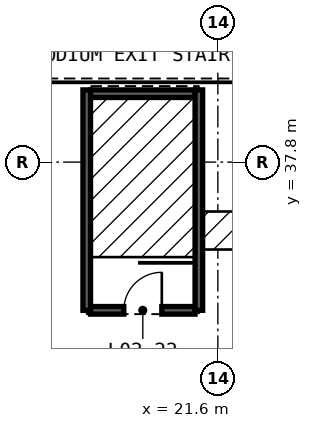
"""IFC4 building model, lengths in metres.
Left out: names, types, materials, properties, quantities, classifications, styles, units other than length and angle.
Written with IfcOpenShell. Run it as: python <this file> out.ifc"""

import sys

from ifc_helpers import new_model, si_unit, direction, frame, frame_2d, origin, place, context, subcontext, project, spatial, rectangle, extrude, element, fill, save


model = new_model("IFC4")
c1 = context("Model", 3, precision=1e-05, world=origin(), true_north=direction((0.0, 1.0)))
c2 = subcontext(c1, "Body", "Model", "MODEL_VIEW")
j1 = project(units=[si_unit("LENGTHUNIT", "METRE"), si_unit("PLANEANGLEUNIT", "RADIAN")], contexts=[c1])
p1 = place(None, origin())
s1 = spatial("IfcSite", under=j1, at=p1, CompositionType="ELEMENT")
p2 = place(p1, origin())
s2 = spatial("IfcBuilding", under=s1, at=p2, CompositionType="ELEMENT")
p3 = place(p2, frame((0.0, 0.0, 9.0)))
s3 = spatial("IfcBuildingStorey", under=s2, at=p3, CompositionType="ELEMENT", Elevation=9.0)
p4 = place(p3, frame((18.25, 33.9, 0.0), z_axis=(0.0, 0.0, 1.0), x_axis=(1.0, 0.0, 0.0)))
e1 = element("IfcWall", 1, at=p4, inside=s3, PredefinedType="SOLIDWALL", context=c2, shape_type="SweptSolid", body=[
    extrude(rectangle(XDim=2.75, YDim=0.2, at=frame_2d((1.375, 0.0))), origin(), (0.0, 0.0, 1.0), 3.0),
])
p5 = place(p4, frame((1.875, 0.0, 0.0), z_axis=(0.0, 0.0, 1.0), x_axis=(-1.0, 0.0, 0.0)))
e2 = element("IfcOpeningElement", 2, at=p5, cuts=e1, PredefinedType="OPENING", context=c2, shape_type="SweptSolid", body=[
    extrude(rectangle(XDim=1.0, YDim=2.1, at=frame_2d((0.5, 1.05))), frame((0.0, 0.11, 0.0), z_axis=(0.0, -1.0, 0.0), x_axis=(1.0, 0.0, 0.0)), (0.0, 0.0, 1.0), 0.22),
])
p6 = place(p3, frame((18.25, 39.6, 0.0), z_axis=(0.0, 0.0, 1.0), x_axis=(1.0, 0.0, 0.0)))
e3 = element("IfcWall", 3, at=p6, inside=s3, PredefinedType="SOLIDWALL", context=c2, shape_type="SweptSolid", body=[
    extrude(rectangle(XDim=2.75, YDim=0.2, at=frame_2d((1.375, 0.0))), origin(), (0.0, 0.0, 1.0), 3.0),
])
for number, where, z_axis, x_axis in (
    (4, (18.15, 33.9, 0.0), (0.0, 0.0, 1.0), (0.0, 1.0, 0.0)),
    (5, (21.1, 33.9, 0.0), (0.0, 0.0, 1.0), (0.0, 1.0, 0.0)),
):
    element("IfcWall", number, at=place(p3, frame(where, z_axis=z_axis, x_axis=x_axis)), inside=s3, PredefinedType="SOLIDWALL", context=c2, shape_type="SweptSolid", body=[
        extrude(rectangle(XDim=5.8, YDim=0.2, at=frame_2d((2.9, 0.0))), origin(), (0.0, 0.0, 1.0), 3.0),
    ])
p7 = place(p5, origin())
e6 = element("IfcDoor", 6, at=p7, inside=s3, OperationType="SINGLE_SWING_LEFT", PredefinedType="DOOR", context=c2, shape_type="SweptSolid", body=[
    extrude(rectangle(XDim=1.0, YDim=2.1, at=frame_2d((0.5, 1.05))), frame((0.0, 0.025, 0.0), z_axis=(0.0, -1.0, 0.0), x_axis=(1.0, 0.0, 0.0)), (0.0, 0.0, 1.0), 0.05),
])
fill(e2, e6)
save(model, sys.argv[1])
